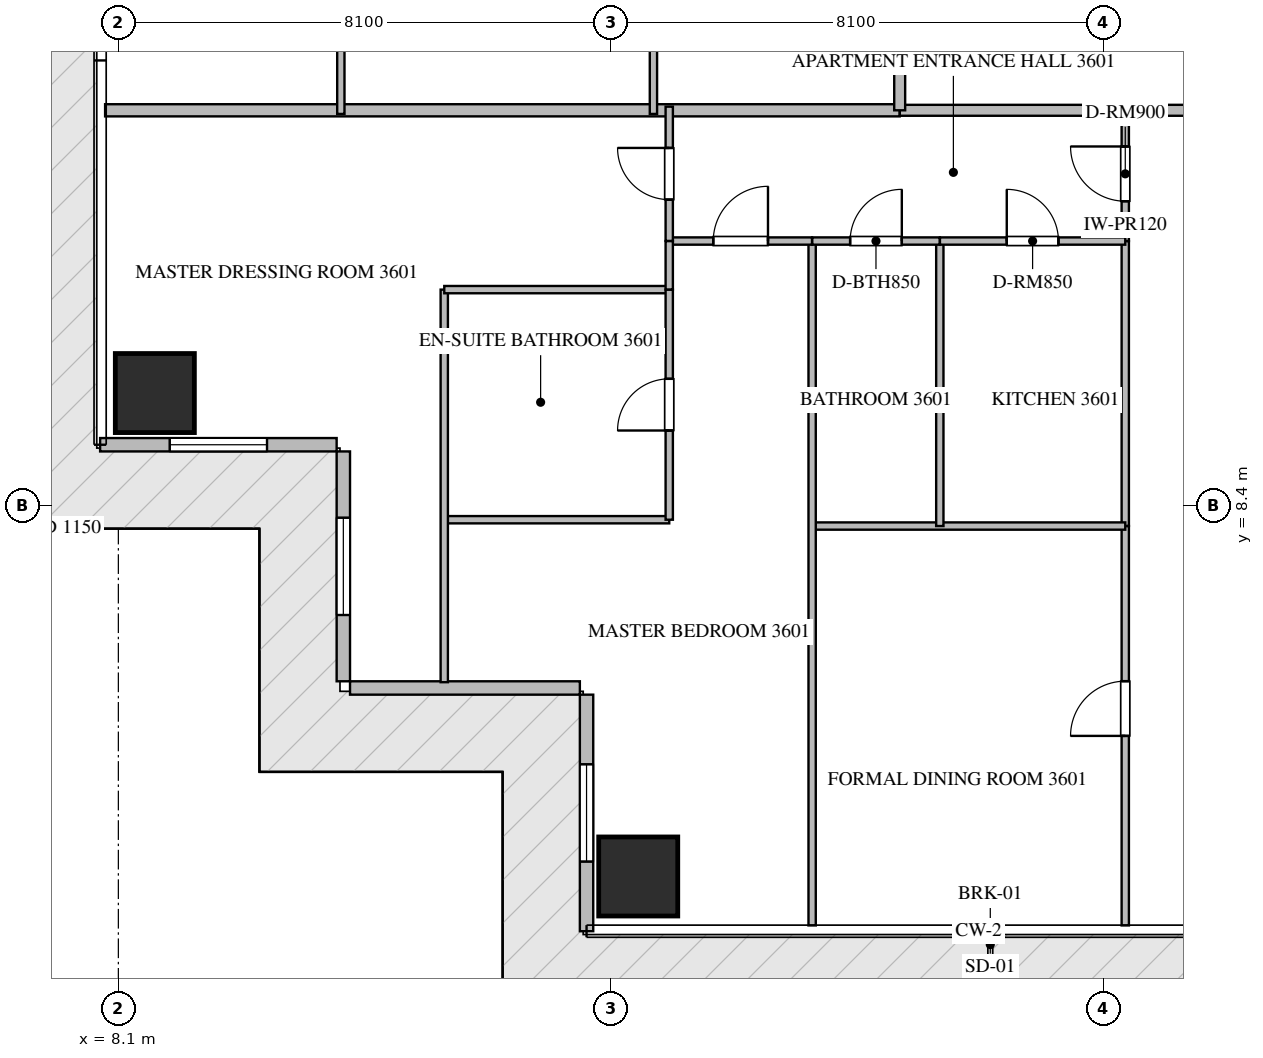
"""IFC4 building model, lengths in metres.
Left out: names, types, materials, properties, quantities, classifications, styles, units other than length and angle.
Written with IfcOpenShell. Run it as: python <this file> out.ifc"""

import sys

from ifc_helpers import new_model, si_unit, direction, frame, frame_2d, origin, origin_2d, place, context, subcontext, project, spatial, rectangle, extrude, source, transform, mapped, element, fill, save


model = new_model("IFC4")
c1 = context("Model", 3, precision=1e-05, world=origin(), true_north=direction((0.0, 1.0)))
c2 = subcontext(c1, "Body", "Model", "MODEL_VIEW")
j1 = project(units=[si_unit("LENGTHUNIT", "METRE"), si_unit("PLANEANGLEUNIT", "RADIAN")], contexts=[c1])
p1 = place(None, origin())
s1 = spatial("IfcSite", under=j1, at=p1, CompositionType="ELEMENT")
p2 = place(p1, origin())
s2 = spatial("IfcBuilding", under=s1, at=p2, CompositionType="ELEMENT")
p3 = place(p2, frame((0.0, 0.0, 146.4)))
s3 = spatial("IfcBuildingStorey", under=s2, at=p3, CompositionType="ELEMENT", Elevation=146.4)
m1 = source(origin(), c2, "Body", "SweptSolid", [
    extrude(rectangle(XDim=1.3, YDim=1.3, at=origin_2d()), origin(), (0.0, 0.0, 1.0), 3.75),
])
for number, where, z_axis, x_axis in (
    (1, (16.65, 2.3, -0.26), (0.0, 0.0, 1.0), (1.0, 0.0, 0.0)),
    (2, (8.7, 10.25, -0.26), (0.0, 0.0, 1.0), (1.0, 0.0, 0.0)),
):
    element("IfcColumn", number, at=place(p3, frame(where, z_axis=z_axis, x_axis=x_axis)), inside=s3, PredefinedType="COLUMN", context=c2, shape_type="MappedRepresentation", body=[
        mapped(m1, transform((0.0, 0.0, 0.0), scale=1.0)),
    ])
p4 = place(p3, frame((7.8, 9.4, 0.0), z_axis=(0.0, 0.0, 1.0), x_axis=(1.0, 0.0, 0.0)))
e3 = element("IfcWall", 3, at=p4, inside=s3, PredefinedType="ELEMENTEDWALL", context=c2, shape_type="SweptSolid", body=[
    extrude(rectangle(XDim=3.89, YDim=0.22, at=frame_2d((1.945, 0.0))), origin(), (0.0, 0.0, 1.0), 3.475),
])
p5 = place(p4, frame((1.145, 0.0, 0.65)))
e4 = element("IfcOpeningElement", 4, at=p5, cuts=e3, PredefinedType="OPENING", context=c2, shape_type="SweptSolid", body=[
    extrude(rectangle(XDim=1.6, YDim=2.1, at=frame_2d((0.8, 1.05))), frame((0.0, 0.12, 0.0), z_axis=(0.0, -1.0, 0.0), x_axis=(1.0, 0.0, 0.0)), (0.0, 0.0, 1.0), 0.24),
])
p6 = place(p3, frame((11.8, 9.29, 0.0), z_axis=(0.0, 0.0, 1.0), x_axis=(0.0, -1.0, 0.0)))
e5 = element("IfcWall", 5, at=p6, inside=s3, PredefinedType="ELEMENTEDWALL", context=c2, shape_type="SweptSolid", body=[
    extrude(rectangle(XDim=3.78, YDim=0.22, at=frame_2d((1.89, 0.0))), origin(), (0.0, 0.0, 1.0), 3.475),
])
p7 = place(p6, frame((1.09, 0.0, 0.65)))
e6 = element("IfcOpeningElement", 6, at=p7, cuts=e5, PredefinedType="OPENING", context=c2, shape_type="SweptSolid", body=[
    extrude(rectangle(XDim=1.6, YDim=2.1, at=frame_2d((0.8, 1.05))), frame((0.0, 0.12, 0.0), z_axis=(0.0, -1.0, 0.0), x_axis=(1.0, 0.0, 0.0)), (0.0, 0.0, 1.0), 0.24),
])
p8 = place(p3, frame((11.91, 5.4, 0.0), z_axis=(0.0, 0.0, 1.0), x_axis=(1.0, 0.0, 0.0)))
e7 = element("IfcWall", 7, at=p8, inside=s3, PredefinedType="ELEMENTEDWALL", context=c2, shape_type="SweptSolid", body=[
    extrude(rectangle(XDim=3.78, YDim=0.22, at=frame_2d((1.89, 0.0))), origin(), (0.0, 0.0, 1.0), 3.475),
])
p9 = place(p3, frame((15.8, 5.29, 0.0), z_axis=(0.0, 0.0, 1.0), x_axis=(0.0, -1.0, 0.0)))
e8 = element("IfcWall", 8, at=p9, inside=s3, PredefinedType="ELEMENTEDWALL", context=c2, shape_type="SweptSolid", body=[
    extrude(rectangle(XDim=3.89, YDim=0.22, at=frame_2d((1.945, 0.0))), origin(), (0.0, 0.0, 1.0), 3.475),
])
p10 = place(p9, frame((1.145, 0.0, 0.65)))
e9 = element("IfcOpeningElement", 9, at=p10, cuts=e8, PredefinedType="OPENING", context=c2, shape_type="SweptSolid", body=[
    extrude(rectangle(XDim=1.6, YDim=2.1, at=frame_2d((0.8, 1.05))), frame((0.0, 0.12, 0.0), z_axis=(0.0, -1.0, 0.0), x_axis=(1.0, 0.0, 0.0)), (0.0, 0.0, 1.0), 0.24),
])
p11 = place(p3, frame((7.882, 14.9, 0.0), z_axis=(0.0, 0.0, 1.0), x_axis=(1.0, 0.0, 0.0)))
e10 = element("IfcWall", 10, at=p11, inside=s3, PredefinedType="PARTITIONING", context=c2, shape_type="SweptSolid", body=[
    extrude(rectangle(XDim=13.068, YDim=0.2, at=frame_2d((6.534, 0.0))), origin(), (0.0, 0.0, 1.0), 3.49),
])
p12 = place(p3, frame((20.952, 14.9, 0.0), z_axis=(0.0, 0.0, 1.0), x_axis=(1.0, 0.0, 0.0)))
e11 = element("IfcWall", 11, at=p12, inside=s3, PredefinedType="PARTITIONING", context=c2, shape_type="SweptSolid", body=[
    extrude(rectangle(XDim=22.896, YDim=0.18, at=frame_2d((11.448, 0.0))), origin(), (0.0, 0.0, 1.0), 3.49),
])
p13 = place(p12, frame((7.51, 0.0, 0.0)))
e12 = element("IfcOpeningElement", 12, at=p13, cuts=e11, PredefinedType="OPENING", context=c2, shape_type="SweptSolid", body=[
    extrude(rectangle(XDim=1.0, YDim=2.15, at=frame_2d((0.5, 1.075))), frame((0.0, 0.1, 0.0), z_axis=(0.0, -1.0, 0.0), x_axis=(1.0, 0.0, 0.0)), (0.0, 0.0, 1.0), 0.2),
])
p14 = place(p3, frame((20.95, 14.9, 0.0), z_axis=(0.0, 0.0, 1.0), x_axis=(0.0, 1.0, 0.0)))
e13 = element("IfcWall", 13, at=p14, inside=s3, PredefinedType="PARTITIONING", context=c2, shape_type="SweptSolid", body=[
    extrude(rectangle(XDim=18.7, YDim=0.18, at=frame_2d((9.35, 0.0))), origin(), (0.0, 0.0, 1.0), 3.49),
])
p15 = place(p14, frame((14.603, 0.0, 0.0)))
e14 = element("IfcOpeningElement", 14, at=p15, cuts=e13, PredefinedType="OPENING", context=c2, shape_type="SweptSolid", body=[
    extrude(rectangle(XDim=1.0, YDim=2.15, at=frame_2d((0.5, 1.075))), frame((0.0, 0.1, 0.0), z_axis=(0.0, -1.0, 0.0), x_axis=(1.0, 0.0, 0.0)), (0.0, 0.0, 1.0), 0.2),
])
p16 = place(p3, frame((24.66, 12.75, 0.0), z_axis=(0.0, 0.0, 1.0), x_axis=(0.0, 1.0, 0.0)))
e15 = element("IfcWall", 15, at=p16, inside=s3, PredefinedType="PARTITIONING", context=c2, shape_type="SweptSolid", body=[
    extrude(rectangle(XDim=2.21, YDim=0.12, at=frame_2d((1.105, 0.0))), origin(), (0.0, 0.0, 1.0), 3.49),
])
p17 = place(p16, frame((0.655, 0.0, 0.0)))
e16 = element("IfcOpeningElement", 16, at=p17, cuts=e15, PredefinedType="OPENING", context=c2, shape_type="SweptSolid", body=[
    extrude(rectangle(XDim=0.9, YDim=2.1, at=frame_2d((0.45, 1.05))), frame((0.0, 0.07, 0.0), z_axis=(0.0, -1.0, 0.0), x_axis=(1.0, 0.0, 0.0)), (0.0, 0.0, 1.0), 0.14),
])
p18 = place(p3, frame((24.66, 1.495, 0.0), z_axis=(0.0, 0.0, 1.0), x_axis=(0.0, 1.0, 0.0)))
e17 = element("IfcWall", 17, at=p18, inside=s3, PredefinedType="PARTITIONING", context=c2, shape_type="SweptSolid", body=[
    extrude(rectangle(XDim=6.568, YDim=0.12, at=frame_2d((3.284, 0.0))), origin(), (0.0, 0.0, 1.0), 3.49),
])
p19 = place(p18, frame((3.117, 0.0, 0.0)))
e18 = element("IfcOpeningElement", 18, at=p19, cuts=e17, PredefinedType="OPENING", context=c2, shape_type="SweptSolid", body=[
    extrude(rectangle(XDim=0.9, YDim=2.1, at=frame_2d((0.45, 1.05))), frame((0.0, 0.07, 0.0), z_axis=(0.0, -1.0, 0.0), x_axis=(1.0, 0.0, 0.0)), (0.0, 0.0, 1.0), 0.14),
])
p20 = place(p3, frame((24.66, 8.065, 0.0), z_axis=(0.0, 0.0, 1.0), x_axis=(0.0, 1.0, 0.0)))
e19 = element("IfcWall", 19, at=p20, inside=s3, PredefinedType="PARTITIONING", context=c2, shape_type="SweptSolid", body=[
    extrude(rectangle(XDim=4.683, YDim=0.12, at=frame_2d((2.342, 0.0))), origin(), (0.0, 0.0, 1.0), 3.49),
])
p21 = place(p3, frame((19.51, 8.063, 0.0), z_axis=(0.0, 0.0, 1.0), x_axis=(1.0, 0.0, 0.0)))
e20 = element("IfcWall", 20, at=p21, inside=s3, PredefinedType="PARTITIONING", context=c2, shape_type="SweptSolid", body=[
    extrude(rectangle(XDim=5.15, YDim=0.12, at=frame_2d((2.575, 0.0))), origin(), (0.0, 0.0, 1.0), 3.49),
])
p22 = place(p3, frame((19.51, 1.495, 0.0), z_axis=(0.0, 0.0, 1.0), x_axis=(0.0, 1.0, 0.0)))
e21 = element("IfcWall", 21, at=p22, inside=s3, PredefinedType="PARTITIONING", context=c2, shape_type="SweptSolid", body=[
    extrude(rectangle(XDim=11.255, YDim=0.12, at=frame_2d((5.627, 0.0))), origin(), (0.0, 0.0, 1.0), 3.49),
])
p23 = place(p3, frame((21.61, 8.063, 0.0), z_axis=(0.0, 0.0, 1.0), x_axis=(0.0, 1.0, 0.0)))
e22 = element("IfcWall", 22, at=p23, inside=s3, PredefinedType="PARTITIONING", context=c2, shape_type="SweptSolid", body=[
    extrude(rectangle(XDim=4.687, YDim=0.12, at=frame_2d((2.344, 0.0))), origin(), (0.0, 0.0, 1.0), 3.49),
])
p24 = place(p3, frame((19.51, 12.75, 0.0), z_axis=(0.0, 0.0, 1.0), x_axis=(1.0, 0.0, 0.0)))
e23 = element("IfcWall", 23, at=p24, inside=s3, PredefinedType="PARTITIONING", context=c2, shape_type="SweptSolid", body=[
    extrude(rectangle(XDim=2.1, YDim=0.12, at=frame_2d((1.05, 0.0))), origin(), (0.0, 0.0, 1.0), 3.49),
])
p25 = place(p24, frame((0.625, 0.0, 0.0)))
e24 = element("IfcOpeningElement", 24, at=p25, cuts=e23, PredefinedType="OPENING", context=c2, shape_type="SweptSolid", body=[
    extrude(rectangle(XDim=0.85, YDim=2.1, at=frame_2d((0.425, 1.05))), frame((0.0, 0.07, 0.0), z_axis=(0.0, -1.0, 0.0), x_axis=(1.0, 0.0, 0.0)), (0.0, 0.0, 1.0), 0.14),
])
p26 = place(p3, frame((21.612, 12.75, 0.0), z_axis=(0.0, 0.0, 1.0), x_axis=(1.0, 0.0, 0.0)))
e25 = element("IfcWall", 25, at=p26, inside=s3, PredefinedType="PARTITIONING", context=c2, shape_type="SweptSolid", body=[
    extrude(rectangle(XDim=3.048, YDim=0.12, at=frame_2d((1.524, 0.0))), origin(), (0.0, 0.0, 1.0), 3.49),
])
p27 = place(p26, frame((1.099, 0.0, 0.0)))
e26 = element("IfcOpeningElement", 26, at=p27, cuts=e25, PredefinedType="OPENING", context=c2, shape_type="SweptSolid", body=[
    extrude(rectangle(XDim=0.85, YDim=2.1, at=frame_2d((0.425, 1.05))), frame((0.0, 0.07, 0.0), z_axis=(0.0, -1.0, 0.0), x_axis=(1.0, 0.0, 0.0)), (0.0, 0.0, 1.0), 0.14),
])
p28 = place(p3, frame((17.16, 12.75, 0.0), z_axis=(0.0, 0.0, 1.0), x_axis=(1.0, 0.0, 0.0)))
e27 = element("IfcWall", 27, at=p28, inside=s3, PredefinedType="PARTITIONING", context=c2, shape_type="SweptSolid", body=[
    extrude(rectangle(XDim=2.348, YDim=0.12, at=frame_2d((1.174, 0.0))), origin(), (0.0, 0.0, 1.0), 3.49),
])
p29 = place(p28, frame((0.724, 0.0, 0.0)))
e28 = element("IfcOpeningElement", 28, at=p29, cuts=e27, PredefinedType="OPENING", context=c2, shape_type="SweptSolid", body=[
    extrude(rectangle(XDim=0.9, YDim=2.1, at=frame_2d((0.45, 1.05))), frame((0.0, 0.07, 0.0), z_axis=(0.0, -1.0, 0.0), x_axis=(1.0, 0.0, 0.0)), (0.0, 0.0, 1.0), 0.14),
])
p30 = place(p3, frame((13.46, 8.167, 0.0), z_axis=(0.0, 0.0, 1.0), x_axis=(1.0, 0.0, 0.0)))
e29 = element("IfcWall", 29, at=p30, inside=s3, PredefinedType="PARTITIONING", context=c2, shape_type="SweptSolid", body=[
    extrude(rectangle(XDim=3.7, YDim=0.12, at=frame_2d((1.85, 0.0))), origin(), (0.0, 0.0, 1.0), 3.49),
])
p31 = place(p3, frame((13.46, 5.495, 0.0), z_axis=(0.0, 0.0, 1.0), x_axis=(0.0, 1.0, 0.0)))
e30 = element("IfcWall", 30, at=p31, inside=s3, PredefinedType="PARTITIONING", context=c2, shape_type="SweptSolid", body=[
    extrude(rectangle(XDim=6.456, YDim=0.12, at=frame_2d((3.228, 0.0))), origin(), (0.0, 0.0, 1.0), 3.49),
])
p32 = place(p3, frame((13.46, 11.951, 0.0), z_axis=(0.0, 0.0, 1.0), x_axis=(1.0, 0.0, 0.0)))
e31 = element("IfcWall", 31, at=p32, inside=s3, PredefinedType="PARTITIONING", context=c2, shape_type="SweptSolid", body=[
    extrude(rectangle(XDim=3.7, YDim=0.12, at=frame_2d((1.85, 0.0))), origin(), (0.0, 0.0, 1.0), 3.49),
])
p33 = place(p3, frame((17.16, 8.167, 0.0), z_axis=(0.0, 0.0, 1.0), x_axis=(0.0, 1.0, 0.0)))
e32 = element("IfcWall", 32, at=p33, inside=s3, PredefinedType="PARTITIONING", context=c2, shape_type="SweptSolid", body=[
    extrude(rectangle(XDim=3.784, YDim=0.12, at=frame_2d((1.892, 0.0))), origin(), (0.0, 0.0, 1.0), 3.49),
])
p34 = place(p33, frame((1.467, 0.0, 0.0)))
e33 = element("IfcOpeningElement", 33, at=p34, cuts=e32, PredefinedType="OPENING", context=c2, shape_type="SweptSolid", body=[
    extrude(rectangle(XDim=0.85, YDim=2.1, at=frame_2d((0.425, 1.05))), frame((0.0, 0.07, 0.0), z_axis=(0.0, -1.0, 0.0), x_axis=(1.0, 0.0, 0.0)), (0.0, 0.0, 1.0), 0.14),
])
p35 = place(p3, frame((17.16, 11.953, 0.0), z_axis=(0.0, 0.0, 1.0), x_axis=(0.0, 1.0, 0.0)))
e34 = element("IfcWall", 34, at=p35, inside=s3, PredefinedType="PARTITIONING", context=c2, shape_type="SweptSolid", body=[
    extrude(rectangle(XDim=0.797, YDim=0.12, at=frame_2d((0.398, 0.0))), origin(), (0.0, 0.0, 1.0), 3.49),
])
p36 = place(p3, frame((17.16, 12.752, 0.0), z_axis=(0.0, 0.0, 1.0), x_axis=(0.0, 1.0, 0.0)))
e35 = element("IfcWall", 35, at=p36, inside=s3, PredefinedType="PARTITIONING", context=c2, shape_type="SweptSolid", body=[
    extrude(rectangle(XDim=2.208, YDim=0.12, at=frame_2d((1.104, 0.0))), origin(), (0.0, 0.0, 1.0), 3.49),
])
p37 = place(p36, frame((0.679, 0.0, 0.0)))
e36 = element("IfcOpeningElement", 36, at=p37, cuts=e35, PredefinedType="OPENING", context=c2, shape_type="SweptSolid", body=[
    extrude(rectangle(XDim=0.85, YDim=2.1, at=frame_2d((0.425, 1.05))), frame((0.0, 0.07, 0.0), z_axis=(0.0, -1.0, 0.0), x_axis=(1.0, 0.0, 0.0)), (0.0, 0.0, 1.0), 0.14),
])
p38 = place(p3, frame((11.759, 14.84, 0.0), z_axis=(0.0, 0.0, 1.0), x_axis=(0.0, 1.0, 0.0)))
e37 = element("IfcWall", 37, at=p38, inside=s3, PredefinedType="PARTITIONING", context=c2, shape_type="SweptSolid", body=[
    extrude(rectangle(XDim=11.65, YDim=0.12, at=frame_2d((5.825, 0.0))), origin(), (0.0, 0.0, 1.0), 3.49),
])
p39 = place(p3, frame((16.9, 14.84, 0.0), z_axis=(0.0, 0.0, 1.0), x_axis=(0.0, 1.0, 0.0)))
e38 = element("IfcWall", 38, at=p39, inside=s3, PredefinedType="PARTITIONING", context=c2, shape_type="SweptSolid", body=[
    extrude(rectangle(XDim=11.65, YDim=0.12, at=frame_2d((5.825, 0.0))), origin(), (0.0, 0.0, 1.0), 2.972),
])
m2 = source(origin(), c2, "Body", "SweptSolid", [
    extrude(rectangle(XDim=1.6, YDim=2.1, at=frame_2d((0.8, 1.05))), frame((0.0, 0.03, 0.0), z_axis=(0.0, -1.0, 0.0), x_axis=(1.0, 0.0, 0.0)), (0.0, 0.0, 1.0), 0.06),
])
p40 = place(p5, origin())
e39 = element("IfcWindow", 39, at=p40, inside=s3, PartitioningType="SINGLE_PANEL", PredefinedType="WINDOW", context=c2, shape_type="MappedRepresentation", body=[
    mapped(m2, transform((0.0, 0.0, 0.0), scale=1.0)),
])
fill(e4, e39)
p41 = place(p7, origin())
e40 = element("IfcWindow", 40, at=p41, inside=s3, PartitioningType="SINGLE_PANEL", PredefinedType="WINDOW", context=c2, shape_type="MappedRepresentation", body=[
    mapped(m2, transform((0.0, 0.0, 0.0), scale=1.0)),
])
fill(e6, e40)
p42 = place(p10, origin())
e41 = element("IfcWindow", 41, at=p42, inside=s3, PartitioningType="SINGLE_PANEL", PredefinedType="WINDOW", context=c2, shape_type="MappedRepresentation", body=[
    mapped(m2, transform((0.0, 0.0, 0.0), scale=1.0)),
])
fill(e9, e41)
m3 = source(origin(), c2, "Body", "SweptSolid", [
    extrude(rectangle(XDim=0.9, YDim=2.1, at=frame_2d((0.45, 1.05))), frame((0.0, 0.025, 0.0), z_axis=(0.0, -1.0, 0.0), x_axis=(1.0, 0.0, 0.0)), (0.0, 0.0, 1.0), 0.05),
])
p43 = place(p17, origin())
e42 = element("IfcDoor", 42, at=p43, inside=s3, OperationType="SINGLE_SWING_RIGHT", PredefinedType="DOOR", context=c2, shape_type="MappedRepresentation", body=[
    mapped(m3, transform((0.0, 0.0, 0.0), scale=1.0)),
])
fill(e16, e42)
p44 = place(p19, origin())
e43 = element("IfcDoor", 43, at=p44, inside=s3, OperationType="SINGLE_SWING_LEFT", PredefinedType="DOOR", context=c2, shape_type="MappedRepresentation", body=[
    mapped(m3, transform((0.0, 0.0, 0.0), scale=1.0)),
])
fill(e18, e43)
m4 = source(origin(), c2, "Body", "SweptSolid", [
    extrude(rectangle(XDim=0.85, YDim=2.1, at=frame_2d((0.425, 1.05))), frame((0.0, 0.025, 0.0), z_axis=(0.0, -1.0, 0.0), x_axis=(1.0, 0.0, 0.0)), (0.0, 0.0, 1.0), 0.05),
])
p45 = place(p25, origin())
e44 = element("IfcDoor", 44, at=p45, inside=s3, OperationType="SINGLE_SWING_RIGHT", PredefinedType="DOOR", context=c2, shape_type="MappedRepresentation", body=[
    mapped(m4, transform((0.0, 0.0, 0.0), scale=1.0)),
])
fill(e24, e44)
p46 = place(p27, origin())
e45 = element("IfcDoor", 45, at=p46, inside=s3, OperationType="SINGLE_SWING_LEFT", PredefinedType="DOOR", context=c2, shape_type="MappedRepresentation", body=[
    mapped(m4, transform((0.0, 0.0, 0.0), scale=1.0)),
])
fill(e26, e45)
p47 = place(p29, origin())
e46 = element("IfcDoor", 46, at=p47, inside=s3, OperationType="SINGLE_SWING_RIGHT", PredefinedType="DOOR", context=c2, shape_type="MappedRepresentation", body=[
    mapped(m3, transform((0.0, 0.0, 0.0), scale=1.0)),
])
fill(e28, e46)
p48 = place(p34, origin())
e47 = element("IfcDoor", 47, at=p48, inside=s3, OperationType="SINGLE_SWING_LEFT", PredefinedType="DOOR", context=c2, shape_type="MappedRepresentation", body=[
    mapped(m4, transform((0.0, 0.0, 0.0), scale=1.0)),
])
fill(e33, e47)
p49 = place(p37, origin())
e48 = element("IfcDoor", 48, at=p49, inside=s3, OperationType="SINGLE_SWING_RIGHT", PredefinedType="DOOR", context=c2, shape_type="MappedRepresentation", body=[
    mapped(m4, transform((0.0, 0.0, 0.0), scale=1.0)),
])
fill(e36, e48)
save(model, sys.argv[1])
